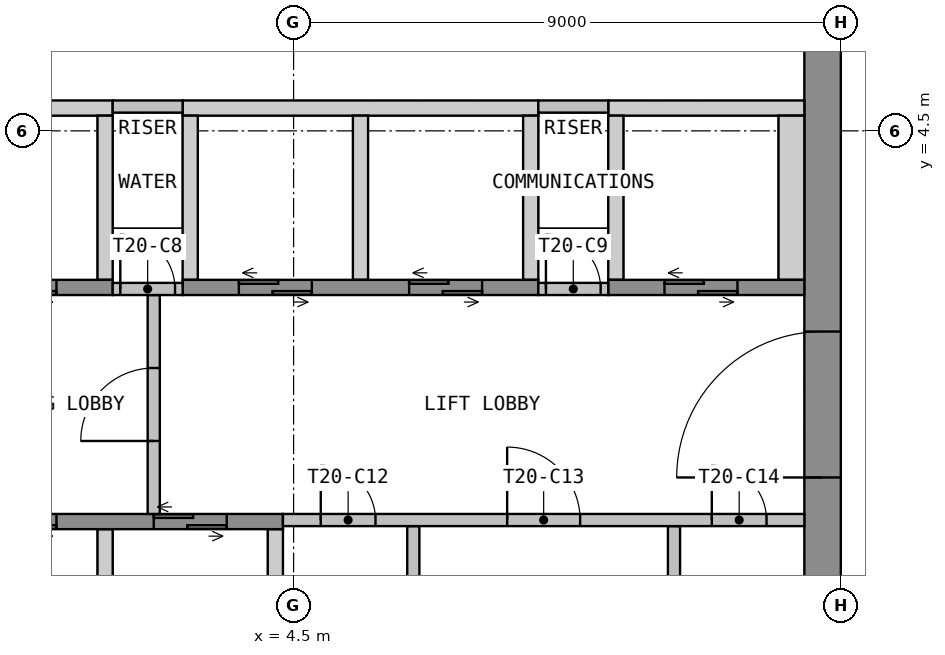
"""IFC4 building model, lengths in metres.
Left out: names, types, materials, properties, quantities, classifications, styles, units other than length and angle.
Written with IfcOpenShell. Run it as: python <this file> out.ifc"""

import sys

from ifc_helpers import new_model, si_unit, direction, frame, frame_2d, origin, place, context, subcontext, project, spatial, polyline, rectangle, outline, extrude, element, fill, save


model = new_model("IFC4")
c1 = context("Model", 3, precision=1e-05, world=origin(), true_north=direction((0.0, 1.0)))
c2 = subcontext(c1, "Body", "Model", "MODEL_VIEW")
j1 = project(units=[si_unit("LENGTHUNIT", "METRE"), si_unit("PLANEANGLEUNIT", "RADIAN")], contexts=[c1])
p1 = place(None, origin())
s1 = spatial("IfcSite", under=j1, at=p1, CompositionType="ELEMENT")
p2 = place(p1, origin())
s2 = spatial("IfcBuilding", under=s1, at=p2, CompositionType="ELEMENT")
p3 = place(p2, frame((0.0, 0.0, 270.3)))
s3 = spatial("IfcBuildingStorey", under=s2, at=p3, CompositionType="ELEMENT", Elevation=270.3)
p4 = place(p3, frame((13.2, -10.65, 0.0), z_axis=(0.0, 0.0, 1.0), x_axis=(0.0, 1.0, 0.0)))
e1 = element("IfcWall", 1, at=p4, inside=s3, PredefinedType="SHEAR", context=c2, shape_type="SweptSolid", body=[
    extrude(rectangle(XDim=21.3, YDim=0.6, at=frame_2d((10.65, 0.0))), origin(), (0.0, 0.0, 1.0), 3.575),
])
p5 = place(p4, frame((9.45, 0.0, 0.0)))
e2 = element("IfcOpeningElement", 2, at=p5, cuts=e1, PredefinedType="OPENING", context=c2, shape_type="SweptSolid", body=[
    extrude(rectangle(XDim=2.4, YDim=2.1, at=frame_2d((1.2, 1.05))), frame((0.0, 0.31, 0.0), z_axis=(0.0, -1.0, 0.0), x_axis=(1.0, 0.0, 0.0)), (0.0, 0.0, 1.0), 0.62),
])
p6 = place(p3, origin())
e3 = element("IfcWall", 3, at=p6, inside=s3, PredefinedType="SHEAR", context=c2, shape_type="SweptSolid", body=[
    extrude(outline(polyline([(-1.525, 4.75), (1.525, 4.75), (1.525, 5.0), (-1.525, 5.0), (-1.525, 4.75)])), origin(), (0.0, 0.0, 1.0), 3.575),
])
p7 = place(p3, origin())
e4 = element("IfcWall", 4, at=p7, inside=s3, PredefinedType="SHEAR", context=c2, shape_type="SweptSolid", body=[
    extrude(outline(polyline([(2.675, 4.75), (8.525, 4.75), (8.525, 5.0), (2.675, 5.0), (2.675, 4.75)])), origin(), (0.0, 0.0, 1.0), 3.575),
])
p8 = place(p3, origin())
e5 = element("IfcWall", 5, at=p8, inside=s3, PredefinedType="SHEAR", context=c2, shape_type="SweptSolid", body=[
    extrude(outline(polyline([(9.675, 4.75), (12.9, 4.75), (12.9, 5.0), (9.675, 5.0), (9.675, 4.75)])), origin(), (0.0, 0.0, 1.0), 3.575),
])
p9 = place(p3, origin())
e6 = element("IfcWall", 6, at=p9, inside=s3, PredefinedType="SHEAR", context=c2, shape_type="SweptSolid", body=[
    extrude(outline(polyline([(1.275, 2.05), (1.525, 2.05), (1.525, 4.75), (1.275, 4.75), (1.275, 2.05)])), origin(), (0.0, 0.0, 1.0), 3.575),
])
p10 = place(p3, origin())
e7 = element("IfcWall", 7, at=p10, inside=s3, PredefinedType="SHEAR", context=c2, shape_type="SweptSolid", body=[
    extrude(outline(polyline([(2.675, 2.05), (2.925, 2.05), (2.925, 4.75), (2.675, 4.75), (2.675, 2.05)])), origin(), (0.0, 0.0, 1.0), 3.575),
])
p11 = place(p3, origin())
e8 = element("IfcWall", 8, at=p11, inside=s3, PredefinedType="SHEAR", context=c2, shape_type="SweptSolid", body=[
    extrude(outline(polyline([(5.475, 2.05), (5.725, 2.05), (5.725, 4.75), (5.475, 4.75), (5.475, 2.05)])), origin(), (0.0, 0.0, 1.0), 3.575),
])
p12 = place(p3, origin())
e9 = element("IfcWall", 9, at=p12, inside=s3, PredefinedType="SHEAR", context=c2, shape_type="SweptSolid", body=[
    extrude(outline(polyline([(8.275, 2.05), (8.525, 2.05), (8.525, 4.75), (8.275, 4.75), (8.275, 2.05)])), origin(), (0.0, 0.0, 1.0), 3.575),
])
p13 = place(p3, origin())
e10 = element("IfcWall", 10, at=p13, inside=s3, PredefinedType="SHEAR", context=c2, shape_type="SweptSolid", body=[
    extrude(outline(polyline([(9.675, 2.05), (9.925, 2.05), (9.925, 4.75), (9.675, 4.75), (9.675, 2.05)])), origin(), (0.0, 0.0, 1.0), 3.575),
])
p14 = place(p3, origin())
e11 = element("IfcWall", 11, at=p14, inside=s3, PredefinedType="SHEAR", context=c2, shape_type="SweptSolid", body=[
    extrude(outline(polyline([(12.475, 2.05), (12.9, 2.05), (12.9, 4.75), (12.475, 4.75), (12.475, 2.05)])), origin(), (0.0, 0.0, 1.0), 3.575),
])
p15 = place(p3, frame((-1.525, 1.925, 0.0), z_axis=(0.0, 0.0, 1.0), x_axis=(1.0, 0.0, 0.0)))
e12 = element("IfcWall", 12, at=p15, inside=s3, PredefinedType="SHEAR", context=c2, shape_type="SweptSolid", body=[
    extrude(rectangle(XDim=3.05, YDim=0.25, at=frame_2d((1.525, 0.0))), origin(), (0.0, 0.0, 1.0), 3.575),
])
p16 = place(p15, frame((0.925, 0.0, 0.0)))
e13 = element("IfcOpeningElement", 13, at=p16, cuts=e12, PredefinedType="OPENING", context=c2, shape_type="SweptSolid", body=[
    extrude(rectangle(XDim=1.2, YDim=2.1, at=frame_2d((0.6, 1.05))), frame((0.0, 0.135, 0.0), z_axis=(0.0, -1.0, 0.0), x_axis=(1.0, 0.0, 0.0)), (0.0, 0.0, 1.0), 0.27),
])
p17 = place(p3, frame((2.675, 1.925, 0.0), z_axis=(0.0, 0.0, 1.0), x_axis=(1.0, 0.0, 0.0)))
e14 = element("IfcWall", 14, at=p17, inside=s3, PredefinedType="SHEAR", context=c2, shape_type="SweptSolid", body=[
    extrude(rectangle(XDim=5.85, YDim=0.25, at=frame_2d((2.925, 0.0))), origin(), (0.0, 0.0, 1.0), 3.575),
])
p18 = place(p17, frame((0.925, 0.0, 0.0)))
e15 = element("IfcOpeningElement", 15, at=p18, cuts=e14, PredefinedType="OPENING", context=c2, shape_type="SweptSolid", body=[
    extrude(rectangle(XDim=1.2, YDim=2.1, at=frame_2d((0.6, 1.05))), frame((0.0, 0.135, 0.0), z_axis=(0.0, -1.0, 0.0), x_axis=(1.0, 0.0, 0.0)), (0.0, 0.0, 1.0), 0.27),
])
p19 = place(p17, frame((3.725, 0.0, 0.0)))
e16 = element("IfcOpeningElement", 16, at=p19, cuts=e14, PredefinedType="OPENING", context=c2, shape_type="SweptSolid", body=[
    extrude(rectangle(XDim=1.2, YDim=2.1, at=frame_2d((0.6, 1.05))), frame((0.0, 0.135, 0.0), z_axis=(0.0, -1.0, 0.0), x_axis=(1.0, 0.0, 0.0)), (0.0, 0.0, 1.0), 0.27),
])
p20 = place(p3, frame((9.675, 1.925, 0.0), z_axis=(0.0, 0.0, 1.0), x_axis=(1.0, 0.0, 0.0)))
e17 = element("IfcWall", 17, at=p20, inside=s3, PredefinedType="SHEAR", context=c2, shape_type="SweptSolid", body=[
    extrude(rectangle(XDim=3.225, YDim=0.25, at=frame_2d((1.612, 0.0))), origin(), (0.0, 0.0, 1.0), 3.575),
])
p21 = place(p20, frame((0.925, 0.0, 0.0)))
e18 = element("IfcOpeningElement", 18, at=p21, cuts=e17, PredefinedType="OPENING", context=c2, shape_type="SweptSolid", body=[
    extrude(rectangle(XDim=1.2, YDim=2.1, at=frame_2d((0.6, 1.05))), frame((0.0, 0.135, 0.0), z_axis=(0.0, -1.0, 0.0), x_axis=(1.0, 0.0, 0.0)), (0.0, 0.0, 1.0), 0.27),
])
p22 = place(p3, origin())
e19 = element("IfcWall", 19, at=p22, inside=s3, PredefinedType="SHEAR", context=c2, shape_type="SweptSolid", body=[
    extrude(outline(polyline([(1.275, -4.75), (1.525, -4.75), (1.525, -2.05), (1.275, -2.05), (1.275, -4.75)])), origin(), (0.0, 0.0, 1.0), 3.575),
])
p23 = place(p3, origin())
e20 = element("IfcWall", 20, at=p23, inside=s3, PredefinedType="SHEAR", context=c2, shape_type="SweptSolid", body=[
    extrude(outline(polyline([(4.075, -4.75), (4.325, -4.75), (4.325, -2.05), (4.075, -2.05), (4.075, -4.75)])), origin(), (0.0, 0.0, 1.0), 3.575),
])
p24 = place(p3, frame((-1.525, -1.925, 0.0), z_axis=(0.0, 0.0, 1.0), x_axis=(1.0, 0.0, 0.0)))
e21 = element("IfcWall", 21, at=p24, inside=s3, PredefinedType="SHEAR", context=c2, shape_type="SweptSolid", body=[
    extrude(rectangle(XDim=5.85, YDim=0.25, at=frame_2d((2.925, 0.0))), origin(), (0.0, 0.0, 1.0), 3.575),
])
p25 = place(p24, frame((0.925, 0.0, 0.0)))
e22 = element("IfcOpeningElement", 22, at=p25, cuts=e21, PredefinedType="OPENING", context=c2, shape_type="SweptSolid", body=[
    extrude(rectangle(XDim=1.2, YDim=2.1, at=frame_2d((0.6, 1.05))), frame((0.0, 0.135, 0.0), z_axis=(0.0, -1.0, 0.0), x_axis=(1.0, 0.0, 0.0)), (0.0, 0.0, 1.0), 0.27),
])
p26 = place(p24, frame((3.725, 0.0, 0.0)))
e23 = element("IfcOpeningElement", 23, at=p26, cuts=e21, PredefinedType="OPENING", context=c2, shape_type="SweptSolid", body=[
    extrude(rectangle(XDim=1.2, YDim=2.1, at=frame_2d((0.6, 1.05))), frame((0.0, 0.135, 0.0), z_axis=(0.0, -1.0, 0.0), x_axis=(1.0, 0.0, 0.0)), (0.0, 0.0, 1.0), 0.27),
])
p27 = place(p3, frame((2.2, -1.8, 0.0), z_axis=(0.0, 0.0, 1.0), x_axis=(0.0, 1.0, 0.0)))
e24 = element("IfcWall", 24, at=p27, inside=s3, PredefinedType="PARTITIONING", context=c2, shape_type="SweptSolid", body=[
    extrude(rectangle(XDim=3.6, YDim=0.2, at=frame_2d((1.8, 0.0))), origin(), (0.0, 0.0, 1.0), 3.575),
])
p28 = place(p27, frame((1.2, 0.0, 0.0)))
e25 = element("IfcOpeningElement", 25, at=p28, cuts=e24, PredefinedType="OPENING", context=c2, shape_type="SweptSolid", body=[
    extrude(rectangle(XDim=1.2, YDim=2.1, at=frame_2d((0.6, 1.05))), frame((0.0, 0.11, 0.0), z_axis=(0.0, -1.0, 0.0), x_axis=(1.0, 0.0, 0.0)), (0.0, 0.0, 1.0), 0.22),
])
p29 = place(p3, frame((1.525, 1.9, 0.0), z_axis=(0.0, 0.0, 1.0), x_axis=(1.0, 0.0, 0.0)))
e26 = element("IfcWall", 26, at=p29, inside=s3, PredefinedType="PARTITIONING", context=c2, shape_type="SweptSolid", body=[
    extrude(rectangle(XDim=1.15, YDim=0.2, at=frame_2d((0.575, 0.0))), origin(), (0.0, 0.0, 1.0), 3.575),
])
p30 = place(p29, frame((0.125, 0.0, 0.0)))
e27 = element("IfcOpeningElement", 27, at=p30, cuts=e26, PredefinedType="OPENING", context=c2, shape_type="SweptSolid", body=[
    extrude(rectangle(XDim=0.9, YDim=2.1, at=frame_2d((0.45, 1.05))), frame((0.0, 0.11, 0.0), z_axis=(0.0, -1.0, 0.0), x_axis=(1.0, 0.0, 0.0)), (0.0, 0.0, 1.0), 0.22),
])
p31 = place(p3, frame((1.525, 4.9, 0.0), z_axis=(0.0, 0.0, 1.0), x_axis=(1.0, 0.0, 0.0)))
e28 = element("IfcWall", 28, at=p31, inside=s3, PredefinedType="PARTITIONING", context=c2, shape_type="SweptSolid", body=[
    extrude(rectangle(XDim=1.15, YDim=0.2, at=frame_2d((0.575, 0.0))), origin(), (0.0, 0.0, 1.0), 3.575),
])
p32 = place(p3, frame((8.525, 1.9, 0.0), z_axis=(0.0, 0.0, 1.0), x_axis=(1.0, 0.0, 0.0)))
e29 = element("IfcWall", 29, at=p32, inside=s3, PredefinedType="PARTITIONING", context=c2, shape_type="SweptSolid", body=[
    extrude(rectangle(XDim=1.15, YDim=0.2, at=frame_2d((0.575, 0.0))), origin(), (0.0, 0.0, 1.0), 3.575),
])
p33 = place(p32, frame((0.125, 0.0, 0.0)))
e30 = element("IfcOpeningElement", 30, at=p33, cuts=e29, PredefinedType="OPENING", context=c2, shape_type="SweptSolid", body=[
    extrude(rectangle(XDim=0.9, YDim=2.1, at=frame_2d((0.45, 1.05))), frame((0.0, 0.11, 0.0), z_axis=(0.0, -1.0, 0.0), x_axis=(1.0, 0.0, 0.0)), (0.0, 0.0, 1.0), 0.22),
])
p34 = place(p3, frame((8.525, 4.9, 0.0), z_axis=(0.0, 0.0, 1.0), x_axis=(1.0, 0.0, 0.0)))
e31 = element("IfcWall", 31, at=p34, inside=s3, PredefinedType="PARTITIONING", context=c2, shape_type="SweptSolid", body=[
    extrude(rectangle(XDim=1.15, YDim=0.2, at=frame_2d((0.575, 0.0))), origin(), (0.0, 0.0, 1.0), 3.575),
])
for number, where, z_axis, x_axis in (
    (32, (6.469, -4.8, 0.0), (0.0, 0.0, 1.0), (0.0, 1.0, 0.0)),
    (33, (10.756, -4.8, 0.0), (0.0, 0.0, 1.0), (0.0, 1.0, 0.0)),
):
    element("IfcWall", number, at=place(p3, frame(where, z_axis=z_axis, x_axis=x_axis)), inside=s3, PredefinedType="PARTITIONING", context=c2, shape_type="SweptSolid", body=[
        extrude(rectangle(XDim=2.8, YDim=0.2, at=frame_2d((1.4, 0.0))), origin(), (0.0, 0.0, 1.0), 3.575),
    ])
p35 = place(p3, frame((4.325, -1.9, 0.0), z_axis=(0.0, 0.0, 1.0), x_axis=(1.0, 0.0, 0.0)))
e34 = element("IfcWall", 34, at=p35, inside=s3, PredefinedType="PARTITIONING", context=c2, shape_type="SweptSolid", body=[
    extrude(rectangle(XDim=8.575, YDim=0.2, at=frame_2d((4.288, 0.0))), origin(), (0.0, 0.0, 1.0), 3.575),
])
p36 = place(p35, frame((0.622, 0.0, 0.0)))
e35 = element("IfcOpeningElement", 35, at=p36, cuts=e34, PredefinedType="OPENING", context=c2, shape_type="SweptSolid", body=[
    extrude(rectangle(XDim=0.9, YDim=2.1, at=frame_2d((0.45, 1.05))), frame((0.0, 0.11, 0.0), z_axis=(0.0, -1.0, 0.0), x_axis=(1.0, 0.0, 0.0)), (0.0, 0.0, 1.0), 0.22),
])
p37 = place(p35, frame((3.688, 0.0, 0.0)))
e36 = element("IfcOpeningElement", 36, at=p37, cuts=e34, PredefinedType="OPENING", context=c2, shape_type="SweptSolid", body=[
    extrude(rectangle(XDim=1.2, YDim=2.1, at=frame_2d((0.6, 1.05))), frame((0.0, 0.11, 0.0), z_axis=(0.0, -1.0, 0.0), x_axis=(1.0, 0.0, 0.0)), (0.0, 0.0, 1.0), 0.22),
])
p38 = place(p35, frame((7.053, 0.0, 0.0)))
e37 = element("IfcOpeningElement", 37, at=p38, cuts=e34, PredefinedType="OPENING", context=c2, shape_type="SweptSolid", body=[
    extrude(rectangle(XDim=0.9, YDim=2.1, at=frame_2d((0.45, 1.05))), frame((0.0, 0.11, 0.0), z_axis=(0.0, -1.0, 0.0), x_axis=(1.0, 0.0, 0.0)), (0.0, 0.0, 1.0), 0.22),
])
p39 = place(p5, origin())
e38 = element("IfcDoor", 38, at=p39, inside=s3, OperationType="DOUBLE_DOOR_DOUBLE_SWING", PredefinedType="DOOR", context=c2, shape_type="SweptSolid", body=[
    extrude(rectangle(XDim=2.4, YDim=2.1, at=frame_2d((1.2, 1.05))), frame((0.0, 0.025, 0.0), z_axis=(0.0, -1.0, 0.0), x_axis=(1.0, 0.0, 0.0)), (0.0, 0.0, 1.0), 0.05),
])
fill(e2, e38)
p40 = place(p16, origin())
e39 = element("IfcDoor", 39, at=p40, inside=s3, OperationType="DOUBLE_DOOR_SLIDING", PredefinedType="DOOR", context=c2, shape_type="SweptSolid", body=[
    extrude(rectangle(XDim=1.2, YDim=2.1, at=frame_2d((0.6, 1.05))), frame((0.0, 0.025, 0.0), z_axis=(0.0, -1.0, 0.0), x_axis=(1.0, 0.0, 0.0)), (0.0, 0.0, 1.0), 0.05),
])
fill(e13, e39)
p41 = place(p18, origin())
e40 = element("IfcDoor", 40, at=p41, inside=s3, OperationType="DOUBLE_DOOR_SLIDING", PredefinedType="DOOR", context=c2, shape_type="SweptSolid", body=[
    extrude(rectangle(XDim=1.2, YDim=2.1, at=frame_2d((0.6, 1.05))), frame((0.0, 0.025, 0.0), z_axis=(0.0, -1.0, 0.0), x_axis=(1.0, 0.0, 0.0)), (0.0, 0.0, 1.0), 0.05),
])
fill(e15, e40)
p42 = place(p19, origin())
e41 = element("IfcDoor", 41, at=p42, inside=s3, OperationType="DOUBLE_DOOR_SLIDING", PredefinedType="DOOR", context=c2, shape_type="SweptSolid", body=[
    extrude(rectangle(XDim=1.2, YDim=2.1, at=frame_2d((0.6, 1.05))), frame((0.0, 0.025, 0.0), z_axis=(0.0, -1.0, 0.0), x_axis=(1.0, 0.0, 0.0)), (0.0, 0.0, 1.0), 0.05),
])
fill(e16, e41)
p43 = place(p21, origin())
e42 = element("IfcDoor", 42, at=p43, inside=s3, OperationType="DOUBLE_DOOR_SLIDING", PredefinedType="DOOR", context=c2, shape_type="SweptSolid", body=[
    extrude(rectangle(XDim=1.2, YDim=2.1, at=frame_2d((0.6, 1.05))), frame((0.0, 0.025, 0.0), z_axis=(0.0, -1.0, 0.0), x_axis=(1.0, 0.0, 0.0)), (0.0, 0.0, 1.0), 0.05),
])
fill(e18, e42)
p44 = place(p25, origin())
e43 = element("IfcDoor", 43, at=p44, inside=s3, OperationType="DOUBLE_DOOR_SLIDING", PredefinedType="DOOR", context=c2, shape_type="SweptSolid", body=[
    extrude(rectangle(XDim=1.2, YDim=2.1, at=frame_2d((0.6, 1.05))), frame((0.0, 0.025, 0.0), z_axis=(0.0, -1.0, 0.0), x_axis=(1.0, 0.0, 0.0)), (0.0, 0.0, 1.0), 0.05),
])
fill(e22, e43)
p45 = place(p26, origin())
e44 = element("IfcDoor", 44, at=p45, inside=s3, OperationType="DOUBLE_DOOR_SLIDING", PredefinedType="DOOR", context=c2, shape_type="SweptSolid", body=[
    extrude(rectangle(XDim=1.2, YDim=2.1, at=frame_2d((0.6, 1.05))), frame((0.0, 0.025, 0.0), z_axis=(0.0, -1.0, 0.0), x_axis=(1.0, 0.0, 0.0)), (0.0, 0.0, 1.0), 0.05),
])
fill(e23, e44)
p46 = place(p28, origin())
e45 = element("IfcDoor", 45, at=p46, inside=s3, OperationType="SINGLE_SWING_LEFT", PredefinedType="DOOR", context=c2, shape_type="SweptSolid", body=[
    extrude(rectangle(XDim=1.2, YDim=2.1, at=frame_2d((0.6, 1.05))), frame((0.0, 0.025, 0.0), z_axis=(0.0, -1.0, 0.0), x_axis=(1.0, 0.0, 0.0)), (0.0, 0.0, 1.0), 0.05),
])
fill(e25, e45)
p47 = place(p30, origin())
e46 = element("IfcDoor", 46, at=p47, inside=s3, OperationType="SINGLE_SWING_LEFT", PredefinedType="DOOR", context=c2, shape_type="SweptSolid", body=[
    extrude(rectangle(XDim=0.9, YDim=2.1, at=frame_2d((0.45, 1.05))), frame((0.0, 0.025, 0.0), z_axis=(0.0, -1.0, 0.0), x_axis=(1.0, 0.0, 0.0)), (0.0, 0.0, 1.0), 0.05),
])
fill(e27, e46)
p48 = place(p33, origin())
e47 = element("IfcDoor", 47, at=p48, inside=s3, OperationType="SINGLE_SWING_LEFT", PredefinedType="DOOR", context=c2, shape_type="SweptSolid", body=[
    extrude(rectangle(XDim=0.9, YDim=2.1, at=frame_2d((0.45, 1.05))), frame((0.0, 0.025, 0.0), z_axis=(0.0, -1.0, 0.0), x_axis=(1.0, 0.0, 0.0)), (0.0, 0.0, 1.0), 0.05),
])
fill(e30, e47)
p49 = place(p36, origin())
e48 = element("IfcDoor", 48, at=p49, inside=s3, OperationType="SINGLE_SWING_LEFT", PredefinedType="DOOR", context=c2, shape_type="SweptSolid", body=[
    extrude(rectangle(XDim=0.9, YDim=2.1, at=frame_2d((0.45, 1.05))), frame((0.0, 0.025, 0.0), z_axis=(0.0, -1.0, 0.0), x_axis=(1.0, 0.0, 0.0)), (0.0, 0.0, 1.0), 0.05),
])
fill(e35, e48)
p50 = place(p37, origin())
e49 = element("IfcDoor", 49, at=p50, inside=s3, OperationType="SINGLE_SWING_RIGHT", PredefinedType="DOOR", context=c2, shape_type="SweptSolid", body=[
    extrude(rectangle(XDim=1.2, YDim=2.1, at=frame_2d((0.6, 1.05))), frame((0.0, 0.025, 0.0), z_axis=(0.0, -1.0, 0.0), x_axis=(1.0, 0.0, 0.0)), (0.0, 0.0, 1.0), 0.05),
])
fill(e36, e49)
p51 = place(p38, origin())
e50 = element("IfcDoor", 50, at=p51, inside=s3, OperationType="SINGLE_SWING_LEFT", PredefinedType="DOOR", context=c2, shape_type="SweptSolid", body=[
    extrude(rectangle(XDim=0.9, YDim=2.1, at=frame_2d((0.45, 1.05))), frame((0.0, 0.025, 0.0), z_axis=(0.0, -1.0, 0.0), x_axis=(1.0, 0.0, 0.0)), (0.0, 0.0, 1.0), 0.05),
])
fill(e37, e50)
save(model, sys.argv[1])
